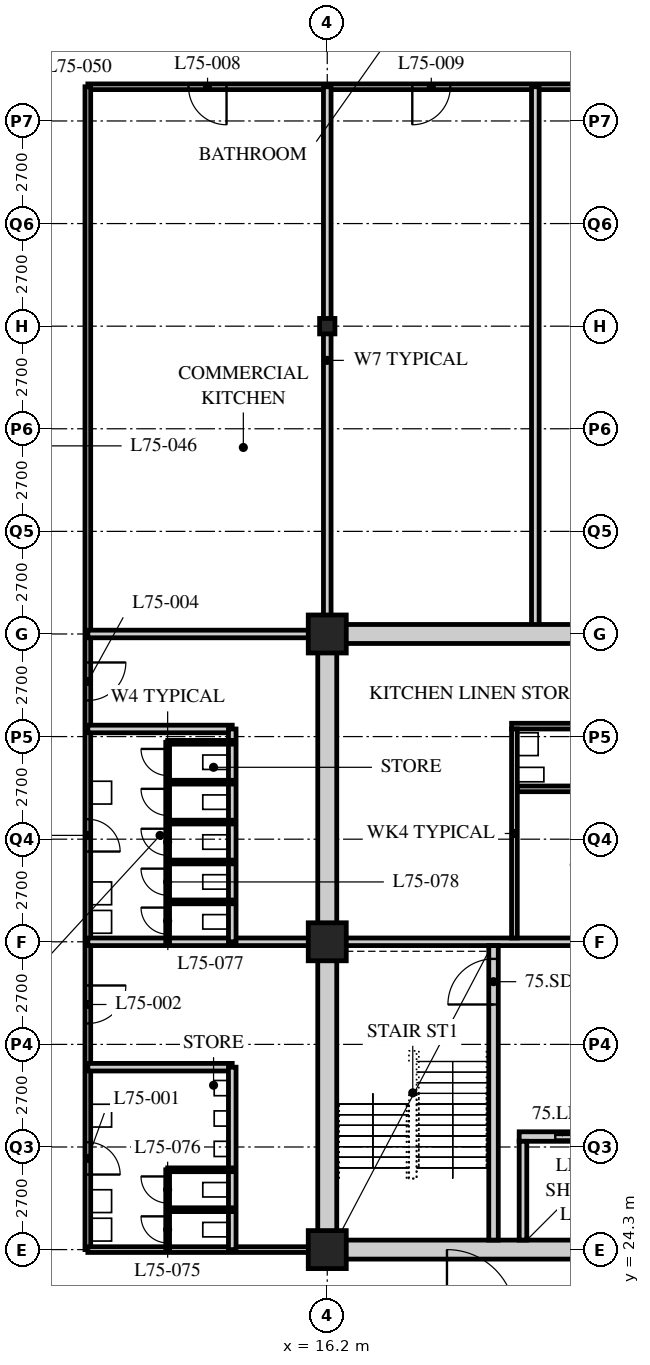
"""IFC4 building model, lengths in metres.
Left out: names, types, materials, properties, quantities, classifications, styles, units other than length and angle.
Written with IfcOpenShell. Run it as: python <this file> out.ifc"""

import sys

from ifc_helpers import new_model, si_unit, direction, frame, frame_2d, origin, origin_2d, place, context, subcontext, project, spatial, rectangle, hollow_rectangle, i_section, extrude, element, fill, save


model = new_model("IFC4")
c1 = context("Model", 3, precision=1e-05, world=origin(), true_north=direction((0.0, 1.0)))
c2 = subcontext(c1, "Body", "Model", "MODEL_VIEW")
j1 = project(units=[si_unit("LENGTHUNIT", "METRE"), si_unit("PLANEANGLEUNIT", "RADIAN")], contexts=[c1])
p1 = place(None, origin())
s1 = spatial("IfcSite", under=j1, at=p1, CompositionType="ELEMENT")
p2 = place(p1, origin())
s2 = spatial("IfcBuilding", under=s1, at=p2, CompositionType="ELEMENT")
p3 = place(p2, frame((0.0, 0.0, 293.1)))
s3 = spatial("IfcBuildingStorey", under=s2, at=p3, CompositionType="ELEMENT", Elevation=293.1)
for number, where, z_axis, x_axis in (
    (1, (16.2, 24.3, 0.0), (0.0, 0.0, 1.0), (1.0, 0.0, 0.0)),
    (2, (16.2, 32.4, 0.0), (0.0, 0.0, 1.0), (1.0, 0.0, 0.0)),
    (3, (16.2, 40.5, 0.0), (0.0, 0.0, 1.0), (1.0, 0.0, 0.0)),
):
    element("IfcColumn", number, at=place(p3, frame(where, z_axis=z_axis, x_axis=x_axis)), inside=s3, PredefinedType="COLUMN", context=c2, shape_type="SweptSolid", body=[
        extrude(hollow_rectangle(XDim=1.0, YDim=1.0, WallThickness=0.1, at=origin_2d()), origin(), (0.0, 0.0, 1.0), 5.4),
    ])
p4 = place(p3, frame((16.2, 48.6, 0.0), z_axis=(0.0, 0.0, 1.0), x_axis=(1.0, 0.0, 0.0)))
e4 = element("IfcColumn", 4, at=p4, inside=s3, PredefinedType="COLUMN", context=c2, shape_type="SweptSolid", body=[
    extrude(i_section(OverallWidth=0.403, OverallDepth=0.406, WebThickness=0.027, FlangeThickness=0.043, FilletRadius=0.015, at=origin_2d()), origin(), (0.0, 0.0, 1.0), 5.4),
])
p5 = place(p3, frame((27.14, 54.9, 0.0), z_axis=(0.0, 0.0, 1.0), x_axis=(-1.0, 0.0, 0.0)))
e5 = element("IfcWall", 5, at=p5, inside=s3, PredefinedType="PARTITIONING", context=c2, shape_type="SweptSolid", body=[
    extrude(rectangle(XDim=17.24, YDim=0.15, at=frame_2d((8.62, 0.0))), origin(), (0.0, 0.0, 1.0), 5.19),
])
p6 = place(p5, frame((13.59, 0.0, 0.0)))
e6 = element("IfcOpeningElement", 6, at=p6, cuts=e5, PredefinedType="OPENING", context=c2, shape_type="SweptSolid", body=[
    extrude(rectangle(XDim=1.0, YDim=2.1, at=frame_2d((0.5, 1.05))), frame((0.0, 0.085, 0.0), z_axis=(0.0, -1.0, 0.0), x_axis=(1.0, 0.0, 0.0)), (0.0, 0.0, 1.0), 0.17),
])
p7 = place(p5, frame((7.702, 0.0, 0.0)))
e7 = element("IfcOpeningElement", 7, at=p7, cuts=e5, PredefinedType="OPENING", context=c2, shape_type="SweptSolid", body=[
    extrude(rectangle(XDim=1.0, YDim=2.1, at=frame_2d((0.5, 1.05))), frame((0.0, 0.085, 0.0), z_axis=(0.0, -1.0, 0.0), x_axis=(1.0, 0.0, 0.0)), (0.0, 0.0, 1.0), 0.17),
])
p8 = place(p5, frame((2.228, 0.0, 0.0)))
e8 = element("IfcOpeningElement", 8, at=p8, cuts=e5, PredefinedType="OPENING", context=c2, shape_type="SweptSolid", body=[
    extrude(rectangle(XDim=1.0, YDim=2.1, at=frame_2d((0.5, 1.05))), frame((0.0, 0.085, 0.0), z_axis=(0.0, -1.0, 0.0), x_axis=(1.0, 0.0, 0.0)), (0.0, 0.0, 1.0), 0.17),
])
p9 = place(p3, frame((9.9, 54.9, 0.0), z_axis=(0.0, 0.0, 1.0), x_axis=(0.0, -1.0, 0.0)))
e9 = element("IfcWall", 9, at=p9, inside=s3, PredefinedType="PARTITIONING", context=c2, shape_type="SweptSolid", body=[
    extrude(rectangle(XDim=30.6, YDim=0.15, at=frame_2d((15.3, 0.0))), origin(), (0.0, 0.0, 1.0), 5.19),
])
p10 = place(p9, frame((27.775, 0.0, 0.0)))
e10 = element("IfcOpeningElement", 10, at=p10, cuts=e9, PredefinedType="OPENING", context=c2, shape_type="SweptSolid", body=[
    extrude(rectangle(XDim=0.85, YDim=2.1, at=frame_2d((0.425, 1.05))), frame((0.0, 0.085, 0.0), z_axis=(0.0, -1.0, 0.0), x_axis=(1.0, 0.0, 0.0)), (0.0, 0.0, 1.0), 0.17),
])
p11 = place(p9, frame((23.65, 0.0, 0.0)))
e11 = element("IfcOpeningElement", 11, at=p11, cuts=e9, PredefinedType="OPENING", context=c2, shape_type="SweptSolid", body=[
    extrude(rectangle(XDim=1.0, YDim=2.1, at=frame_2d((0.5, 1.05))), frame((0.0, 0.085, 0.0), z_axis=(0.0, -1.0, 0.0), x_axis=(1.0, 0.0, 0.0)), (0.0, 0.0, 1.0), 0.17),
])
p12 = place(p9, frame((19.275, 0.0, 0.0)))
e12 = element("IfcOpeningElement", 12, at=p12, cuts=e9, PredefinedType="OPENING", context=c2, shape_type="SweptSolid", body=[
    extrude(rectangle(XDim=0.85, YDim=2.1, at=frame_2d((0.425, 1.05))), frame((0.0, 0.085, 0.0), z_axis=(0.0, -1.0, 0.0), x_axis=(1.0, 0.0, 0.0)), (0.0, 0.0, 1.0), 0.17),
])
p13 = place(p9, frame((15.15, 0.0, 0.0)))
e13 = element("IfcOpeningElement", 13, at=p13, cuts=e9, PredefinedType="OPENING", context=c2, shape_type="SweptSolid", body=[
    extrude(rectangle(XDim=1.0, YDim=2.1, at=frame_2d((0.5, 1.05))), frame((0.0, 0.085, 0.0), z_axis=(0.0, -1.0, 0.0), x_axis=(1.0, 0.0, 0.0)), (0.0, 0.0, 1.0), 0.17),
])
p14 = place(p3, frame((9.9, 24.3, 0.0), z_axis=(0.0, 0.0, 1.0), x_axis=(1.0, 0.0, 0.0)))
e14 = element("IfcWall", 14, at=p14, inside=s3, PredefinedType="PARTITIONING", context=c2, shape_type="SweptSolid", body=[
    extrude(rectangle(XDim=6.1, YDim=0.15, at=frame_2d((3.05, 0.0))), origin(), (0.0, 0.0, 1.0), 4.271),
])
p15 = place(p3, frame((9.9, 32.4, 0.0), z_axis=(0.0, 0.0, 1.0), x_axis=(1.0, 0.0, 0.0)))
e15 = element("IfcWall", 15, at=p15, inside=s3, PredefinedType="SOLIDWALL", context=c2, shape_type="SweptSolid", body=[
    extrude(rectangle(XDim=6.3, YDim=0.2, at=frame_2d((3.15, 0.0))), origin(), (0.0, 0.0, 1.0), 4.271),
])
p16 = place(p3, frame((9.9, 29.1, 0.0), z_axis=(0.0, 0.0, 1.0), x_axis=(1.0, 0.0, 0.0)))
e16 = element("IfcWall", 16, at=p16, inside=s3, PredefinedType="SOLIDWALL", context=c2, shape_type="SweptSolid", body=[
    extrude(rectangle(XDim=3.8, YDim=0.2, at=frame_2d((1.9, 0.0))), origin(), (0.0, 0.0, 1.0), 5.19),
])
p17 = place(p3, frame((13.7, 24.3, 0.0), z_axis=(0.0, 0.0, 1.0), x_axis=(0.0, 1.0, 0.0)))
e17 = element("IfcWall", 17, at=p17, inside=s3, PredefinedType="SOLIDWALL", context=c2, shape_type="SweptSolid", body=[
    extrude(rectangle(XDim=4.8, YDim=0.2, at=frame_2d((2.4, 0.0))), origin(), (0.0, 0.0, 1.0), 5.19),
])
p18 = place(p3, frame((9.9, 38.0, 0.0), z_axis=(0.0, 0.0, 1.0), x_axis=(1.0, 0.0, 0.0)))
e18 = element("IfcWall", 18, at=p18, inside=s3, PredefinedType="SOLIDWALL", context=c2, shape_type="SweptSolid", body=[
    extrude(rectangle(XDim=3.8, YDim=0.2, at=frame_2d((1.9, 0.0))), origin(), (0.0, 0.0, 1.0), 5.19),
])
p19 = place(p3, frame((13.7, 32.4, 0.0), z_axis=(0.0, 0.0, 1.0), x_axis=(0.0, 1.0, 0.0)))
e19 = element("IfcWall", 19, at=p19, inside=s3, PredefinedType="SOLIDWALL", context=c2, shape_type="SweptSolid", body=[
    extrude(rectangle(XDim=5.6, YDim=0.2, at=frame_2d((2.8, 0.0))), origin(), (0.0, 0.0, 1.0), 5.19),
])
p20 = place(p3, frame((16.2, 40.5, 0.0), z_axis=(0.0, 0.0, 1.0), x_axis=(0.0, 1.0, 0.0)))
e20 = element("IfcWall", 20, at=p20, inside=s3, PredefinedType="SOLIDWALL", context=c2, shape_type="SweptSolid", body=[
    extrude(rectangle(XDim=14.4, YDim=0.2, at=frame_2d((7.2, 0.0))), origin(), (0.0, 0.0, 1.0), 4.271),
])
p21 = place(p3, frame((21.675, 54.9, 0.0), z_axis=(0.0, 0.0, 1.0), x_axis=(0.0, -1.0, 0.0)))
e21 = element("IfcWall", 21, at=p21, inside=s3, PredefinedType="SOLIDWALL", context=c2, shape_type="SweptSolid", body=[
    extrude(rectangle(XDim=14.4, YDim=0.2, at=frame_2d((7.2, 0.0))), origin(), (0.0, 0.0, 1.0), 5.19),
])
p22 = place(p3, frame((9.9, 40.5, 0.0), z_axis=(0.0, 0.0, 1.0), x_axis=(1.0, 0.0, 0.0)))
e22 = element("IfcWall", 22, at=p22, inside=s3, PredefinedType="SOLIDWALL", context=c2, shape_type="SweptSolid", body=[
    extrude(rectangle(XDim=6.3, YDim=0.2, at=frame_2d((3.15, 0.0))), origin(), (0.0, 0.0, 1.0), 4.271),
])
p23 = place(p3, frame((12.0, 24.3, 0.0), z_axis=(0.0, 0.0, 1.0), x_axis=(0.0, 1.0, 0.0)))
e23 = element("IfcWall", 23, at=p23, inside=s3, PredefinedType="PARTITIONING", context=c2, shape_type="SweptSolid", body=[
    extrude(rectangle(XDim=2.1, YDim=0.1, at=frame_2d((1.05, 0.0))), origin(), (0.0, 0.0, 1.0), 5.19),
])
p24 = place(p23, frame((0.175, 0.0, 0.0)))
e24 = element("IfcOpeningElement", 24, at=p24, cuts=e23, PredefinedType="OPENING", context=c2, shape_type="SweptSolid", body=[
    extrude(rectangle(XDim=0.7, YDim=2.0, at=frame_2d((0.35, 1.0))), frame((0.0, 0.06, 0.0), z_axis=(0.0, -1.0, 0.0), x_axis=(1.0, 0.0, 0.0)), (0.0, 0.0, 1.0), 0.12),
])
p25 = place(p23, frame((1.225, 0.0, 0.0)))
e25 = element("IfcOpeningElement", 25, at=p25, cuts=e23, PredefinedType="OPENING", context=c2, shape_type="SweptSolid", body=[
    extrude(rectangle(XDim=0.7, YDim=2.0, at=frame_2d((0.35, 1.0))), frame((0.0, 0.06, 0.0), z_axis=(0.0, -1.0, 0.0), x_axis=(1.0, 0.0, 0.0)), (0.0, 0.0, 1.0), 0.12),
])
for number, where, z_axis, x_axis in (
    (26, (12.0, 25.35, 0.0), (0.0, 0.0, 1.0), (1.0, 0.0, 0.0)),
    (27, (12.0, 26.4, 0.0), (0.0, 0.0, 1.0), (1.0, 0.0, 0.0)),
):
    element("IfcWall", number, at=place(p3, frame(where, z_axis=z_axis, x_axis=x_axis)), inside=s3, PredefinedType="PARTITIONING", context=c2, shape_type="SweptSolid", body=[
        extrude(rectangle(XDim=1.7, YDim=0.1, at=frame_2d((0.85, 0.0))), origin(), (0.0, 0.0, 1.0), 5.19),
    ])
p26 = place(p3, frame((12.0, 32.4, 0.0), z_axis=(0.0, 0.0, 1.0), x_axis=(0.0, 1.0, 0.0)))
e28 = element("IfcWall", 28, at=p26, inside=s3, PredefinedType="PARTITIONING", context=c2, shape_type="SweptSolid", body=[
    extrude(rectangle(XDim=5.25, YDim=0.1, at=frame_2d((2.625, 0.0))), origin(), (0.0, 0.0, 1.0), 5.19),
])
p27 = place(p26, frame((0.2, 0.0, 0.0)))
e29 = element("IfcOpeningElement", 29, at=p27, cuts=e28, PredefinedType="OPENING", context=c2, shape_type="SweptSolid", body=[
    extrude(rectangle(XDim=0.7, YDim=2.0, at=frame_2d((0.35, 1.0))), frame((0.0, 0.06, 0.0), z_axis=(0.0, -1.0, 0.0), x_axis=(1.0, 0.0, 0.0)), (0.0, 0.0, 1.0), 0.12),
])
p28 = place(p26, frame((1.225, 0.0, 0.0)))
e30 = element("IfcOpeningElement", 30, at=p28, cuts=e28, PredefinedType="OPENING", context=c2, shape_type="SweptSolid", body=[
    extrude(rectangle(XDim=0.7, YDim=2.0, at=frame_2d((0.35, 1.0))), frame((0.0, 0.06, 0.0), z_axis=(0.0, -1.0, 0.0), x_axis=(1.0, 0.0, 0.0)), (0.0, 0.0, 1.0), 0.12),
])
p29 = place(p26, frame((2.275, 0.0, 0.0)))
e31 = element("IfcOpeningElement", 31, at=p29, cuts=e28, PredefinedType="OPENING", context=c2, shape_type="SweptSolid", body=[
    extrude(rectangle(XDim=0.7, YDim=2.0, at=frame_2d((0.35, 1.0))), frame((0.0, 0.06, 0.0), z_axis=(0.0, -1.0, 0.0), x_axis=(1.0, 0.0, 0.0)), (0.0, 0.0, 1.0), 0.12),
])
p30 = place(p26, frame((3.325, 0.0, 0.0)))
e32 = element("IfcOpeningElement", 32, at=p30, cuts=e28, PredefinedType="OPENING", context=c2, shape_type="SweptSolid", body=[
    extrude(rectangle(XDim=0.7, YDim=2.0, at=frame_2d((0.35, 1.0))), frame((0.0, 0.06, 0.0), z_axis=(0.0, -1.0, 0.0), x_axis=(1.0, 0.0, 0.0)), (0.0, 0.0, 1.0), 0.12),
])
p31 = place(p26, frame((4.375, 0.0, 0.0)))
e33 = element("IfcOpeningElement", 33, at=p31, cuts=e28, PredefinedType="OPENING", context=c2, shape_type="SweptSolid", body=[
    extrude(rectangle(XDim=0.7, YDim=2.0, at=frame_2d((0.35, 1.0))), frame((0.0, 0.06, 0.0), z_axis=(0.0, -1.0, 0.0), x_axis=(1.0, 0.0, 0.0)), (0.0, 0.0, 1.0), 0.12),
])
for number, where, z_axis, x_axis in (
    (34, (12.0, 33.45, 0.0), (0.0, 0.0, 1.0), (1.0, 0.0, 0.0)),
    (35, (12.0, 34.5, 0.0), (0.0, 0.0, 1.0), (1.0, 0.0, 0.0)),
    (36, (12.0, 35.55, 0.0), (0.0, 0.0, 1.0), (1.0, 0.0, 0.0)),
    (37, (12.0, 36.6, 0.0), (0.0, 0.0, 1.0), (1.0, 0.0, 0.0)),
    (38, (12.0, 37.65, 0.0), (0.0, 0.0, 1.0), (1.0, 0.0, 0.0)),
):
    element("IfcWall", number, at=place(p3, frame(where, z_axis=z_axis, x_axis=x_axis)), inside=s3, PredefinedType="PARTITIONING", context=c2, shape_type="SweptSolid", body=[
        extrude(rectangle(XDim=1.7, YDim=0.1, at=frame_2d((0.85, 0.0))), origin(), (0.0, 0.0, 1.0), 5.19),
    ])
p32 = place(p3, frame((15.95, 24.3, 0.0), z_axis=(0.0, 0.0, 1.0), x_axis=(1.0, 0.0, 0.0)))
e39 = element("IfcWall", 39, at=p32, inside=s3, PredefinedType="SOLIDWALL", context=c2, shape_type="SweptSolid", body=[
    extrude(rectangle(XDim=24.8, YDim=0.5, at=frame_2d((12.4, 0.0))), origin(), (0.0, 0.0, 1.0), 4.271),
])
p33 = place(p32, frame((11.5, 0.0, 0.0)))
e40 = element("IfcOpeningElement", 40, at=p33, cuts=e39, PredefinedType="OPENING", context=c2, shape_type="SweptSolid", body=[
    extrude(rectangle(XDim=1.8, YDim=2.4, at=frame_2d((0.9, 1.2))), frame((0.0, 0.26, 0.0), z_axis=(0.0, -1.0, 0.0), x_axis=(1.0, 0.0, 0.0)), (0.0, 0.0, 1.0), 0.52),
])
p34 = place(p3, frame((15.95, 40.5, 0.0), z_axis=(0.0, 0.0, 1.0), x_axis=(1.0, 0.0, 0.0)))
e41 = element("IfcWall", 41, at=p34, inside=s3, PredefinedType="SOLIDWALL", context=c2, shape_type="SweptSolid", body=[
    extrude(rectangle(XDim=24.8, YDim=0.5, at=frame_2d((12.4, 0.0))), origin(), (0.0, 0.0, 1.0), 4.271),
])
p35 = place(p34, frame((11.5, 0.0, 0.0)))
e42 = element("IfcOpeningElement", 42, at=p35, cuts=e41, PredefinedType="OPENING", context=c2, shape_type="SweptSolid", body=[
    extrude(rectangle(XDim=1.8, YDim=2.4, at=frame_2d((0.9, 1.2))), frame((0.0, 0.26, 0.0), z_axis=(0.0, -1.0, 0.0), x_axis=(1.0, 0.0, 0.0)), (0.0, 0.0, 1.0), 0.52),
])
p36 = place(p3, frame((16.2, 24.55, 0.0), z_axis=(0.0, 0.0, 1.0), x_axis=(0.0, 1.0, 0.0)))
e43 = element("IfcWall", 43, at=p36, inside=s3, PredefinedType="SOLIDWALL", context=c2, shape_type="SweptSolid", body=[
    extrude(rectangle(XDim=15.7, YDim=0.5, at=frame_2d((7.85, 0.0))), origin(), (0.0, 0.0, 1.0), 4.271),
])
p37 = place(p3, frame((16.45, 32.4, 0.0), z_axis=(0.0, 0.0, 1.0), x_axis=(1.0, 0.0, 0.0)))
e44 = element("IfcWall", 44, at=p37, inside=s3, PredefinedType="SOLIDWALL", context=c2, shape_type="SweptSolid", body=[
    extrude(rectangle(XDim=7.95, YDim=0.2, at=frame_2d((3.975, 0.0))), origin(), (0.0, 0.0, 1.0), 4.428),
])
p38 = place(p3, frame((20.575, 24.55, 0.0), z_axis=(0.0, 0.0, 1.0), x_axis=(0.0, 1.0, 0.0)))
e45 = element("IfcWall", 45, at=p38, inside=s3, PredefinedType="SOLIDWALL", context=c2, shape_type="SweptSolid", body=[
    extrude(rectangle(XDim=7.75, YDim=0.25, at=frame_2d((3.875, 0.0))), origin(), (0.0, 0.0, 1.0), 5.19),
])
p39 = place(p38, frame((6.2, 0.0, 0.0)))
e46 = element("IfcOpeningElement", 46, at=p39, cuts=e45, PredefinedType="OPENING", context=c2, shape_type="SweptSolid", body=[
    extrude(rectangle(XDim=1.2, YDim=2.1, at=frame_2d((0.6, 1.05))), frame((0.0, 0.135, 0.0), z_axis=(0.0, -1.0, 0.0), x_axis=(1.0, 0.0, 0.0)), (0.0, 0.0, 1.0), 0.27),
])
p40 = place(p3, frame((21.25, 27.275, 0.0), z_axis=(0.0, 0.0, 1.0), x_axis=(1.0, 0.0, 0.0)))
e47 = element("IfcWall", 47, at=p40, inside=s3, PredefinedType="SOLIDWALL", context=c2, shape_type="SweptSolid", body=[
    extrude(rectangle(XDim=2.95, YDim=0.25, at=frame_2d((1.475, 0.0))), origin(), (0.0, 0.0, 1.0), 5.19),
])
p41 = place(p40, frame((0.95, 0.0, 0.0)))
e48 = element("IfcOpeningElement", 48, at=p41, cuts=e47, PredefinedType="OPENING", context=c2, shape_type="SweptSolid", body=[
    extrude(rectangle(XDim=1.1, YDim=2.4, at=frame_2d((0.55, 1.2))), frame((0.0, 0.135, 0.0), z_axis=(0.0, -1.0, 0.0), x_axis=(1.0, 0.0, 0.0)), (0.0, 0.0, 1.0), 0.27),
])
p42 = place(p3, frame((21.35, 24.55, 0.0), z_axis=(0.0, 0.0, 1.0), x_axis=(0.0, 1.0, 0.0)))
e49 = element("IfcWall", 49, at=p42, inside=s3, PredefinedType="SOLIDWALL", context=c2, shape_type="SweptSolid", body=[
    extrude(rectangle(XDim=2.6, YDim=0.2, at=frame_2d((1.3, 0.0))), origin(), (0.0, 0.0, 1.0), 5.19),
])
p43 = place(p3, frame((21.2, 36.425, 0.0), z_axis=(0.0, 0.0, 1.0), x_axis=(1.0, 0.0, 0.0)))
e50 = element("IfcWall", 50, at=p43, inside=s3, PredefinedType="PARTITIONING", context=c2, shape_type="SweptSolid", body=[
    extrude(rectangle(XDim=3.0, YDim=0.15, at=frame_2d((1.5, 0.0))), origin(), (0.0, 0.0, 1.0), 5.19),
])
p44 = place(p3, frame((21.05, 38.075, 0.0), z_axis=(0.0, 0.0, 1.0), x_axis=(1.0, 0.0, 0.0)))
e51 = element("IfcWall", 51, at=p44, inside=s3, PredefinedType="PARTITIONING", context=c2, shape_type="SweptSolid", body=[
    extrude(rectangle(XDim=3.15, YDim=0.15, at=frame_2d((1.575, 0.0))), origin(), (0.0, 0.0, 1.0), 5.19),
])
p45 = place(p3, frame((21.125, 32.5, 0.0), z_axis=(0.0, 0.0, 1.0), x_axis=(0.0, 1.0, 0.0)))
e52 = element("IfcWall", 52, at=p45, inside=s3, PredefinedType="PARTITIONING", context=c2, shape_type="SweptSolid", body=[
    extrude(rectangle(XDim=5.5, YDim=0.15, at=frame_2d((2.75, 0.0))), origin(), (0.0, 0.0, 1.0), 5.19),
])
p46 = place(p10, origin())
e53 = element("IfcDoor", 53, at=p46, inside=s3, OperationType="SINGLE_SWING_RIGHT", PredefinedType="DOOR", context=c2, shape_type="SweptSolid", body=[
    extrude(rectangle(XDim=0.85, YDim=2.1, at=frame_2d((0.425, 1.05))), frame((0.0, 0.025, 0.0), z_axis=(0.0, -1.0, 0.0), x_axis=(1.0, 0.0, 0.0)), (0.0, 0.0, 1.0), 0.05),
])
fill(e10, e53)
p47 = place(p11, origin())
e54 = element("IfcDoor", 54, at=p47, inside=s3, OperationType="SINGLE_SWING_LEFT", PredefinedType="DOOR", context=c2, shape_type="SweptSolid", body=[
    extrude(rectangle(XDim=1.0, YDim=2.1, at=frame_2d((0.5, 1.05))), frame((0.0, 0.025, 0.0), z_axis=(0.0, -1.0, 0.0), x_axis=(1.0, 0.0, 0.0)), (0.0, 0.0, 1.0), 0.05),
])
fill(e11, e54)
p48 = place(p12, origin())
e55 = element("IfcDoor", 55, at=p48, inside=s3, OperationType="SINGLE_SWING_RIGHT", PredefinedType="DOOR", context=c2, shape_type="SweptSolid", body=[
    extrude(rectangle(XDim=0.85, YDim=2.1, at=frame_2d((0.425, 1.05))), frame((0.0, 0.025, 0.0), z_axis=(0.0, -1.0, 0.0), x_axis=(1.0, 0.0, 0.0)), (0.0, 0.0, 1.0), 0.05),
])
fill(e12, e55)
p49 = place(p13, origin())
e56 = element("IfcDoor", 56, at=p49, inside=s3, OperationType="SINGLE_SWING_LEFT", PredefinedType="DOOR", context=c2, shape_type="SweptSolid", body=[
    extrude(rectangle(XDim=1.0, YDim=2.1, at=frame_2d((0.5, 1.05))), frame((0.0, 0.025, 0.0), z_axis=(0.0, -1.0, 0.0), x_axis=(1.0, 0.0, 0.0)), (0.0, 0.0, 1.0), 0.05),
])
fill(e13, e56)
p50 = place(p6, origin())
e57 = element("IfcDoor", 57, at=p50, inside=s3, OperationType="SINGLE_SWING_LEFT", PredefinedType="DOOR", context=c2, shape_type="SweptSolid", body=[
    extrude(rectangle(XDim=1.0, YDim=2.1, at=frame_2d((0.5, 1.05))), frame((0.0, 0.025, 0.0), z_axis=(0.0, -1.0, 0.0), x_axis=(1.0, 0.0, 0.0)), (0.0, 0.0, 1.0), 0.05),
])
fill(e6, e57)
p51 = place(p7, origin())
e58 = element("IfcDoor", 58, at=p51, inside=s3, OperationType="SINGLE_SWING_RIGHT", PredefinedType="DOOR", context=c2, shape_type="SweptSolid", body=[
    extrude(rectangle(XDim=1.0, YDim=2.1, at=frame_2d((0.5, 1.05))), frame((0.0, 0.025, 0.0), z_axis=(0.0, -1.0, 0.0), x_axis=(1.0, 0.0, 0.0)), (0.0, 0.0, 1.0), 0.05),
])
fill(e7, e58)
p52 = place(p24, origin())
e59 = element("IfcDoor", 59, at=p52, inside=s3, OperationType="SINGLE_SWING_RIGHT", PredefinedType="DOOR", context=c2, shape_type="SweptSolid", body=[
    extrude(rectangle(XDim=0.7, YDim=2.0, at=frame_2d((0.35, 1.0))), frame((0.0, 0.025, 0.0), z_axis=(0.0, -1.0, 0.0), x_axis=(1.0, 0.0, 0.0)), (0.0, 0.0, 1.0), 0.05),
])
fill(e24, e59)
p53 = place(p25, origin())
e60 = element("IfcDoor", 60, at=p53, inside=s3, OperationType="SINGLE_SWING_RIGHT", PredefinedType="DOOR", context=c2, shape_type="SweptSolid", body=[
    extrude(rectangle(XDim=0.7, YDim=2.0, at=frame_2d((0.35, 1.0))), frame((0.0, 0.025, 0.0), z_axis=(0.0, -1.0, 0.0), x_axis=(1.0, 0.0, 0.0)), (0.0, 0.0, 1.0), 0.05),
])
fill(e25, e60)
p54 = place(p27, origin())
e61 = element("IfcDoor", 61, at=p54, inside=s3, OperationType="SINGLE_SWING_RIGHT", PredefinedType="DOOR", context=c2, shape_type="SweptSolid", body=[
    extrude(rectangle(XDim=0.7, YDim=2.0, at=frame_2d((0.35, 1.0))), frame((0.0, 0.025, 0.0), z_axis=(0.0, -1.0, 0.0), x_axis=(1.0, 0.0, 0.0)), (0.0, 0.0, 1.0), 0.05),
])
fill(e29, e61)
p55 = place(p28, origin())
e62 = element("IfcDoor", 62, at=p55, inside=s3, OperationType="SINGLE_SWING_RIGHT", PredefinedType="DOOR", context=c2, shape_type="SweptSolid", body=[
    extrude(rectangle(XDim=0.7, YDim=2.0, at=frame_2d((0.35, 1.0))), frame((0.0, 0.025, 0.0), z_axis=(0.0, -1.0, 0.0), x_axis=(1.0, 0.0, 0.0)), (0.0, 0.0, 1.0), 0.05),
])
fill(e30, e62)
p56 = place(p29, origin())
e63 = element("IfcDoor", 63, at=p56, inside=s3, OperationType="SINGLE_SWING_RIGHT", PredefinedType="DOOR", context=c2, shape_type="SweptSolid", body=[
    extrude(rectangle(XDim=0.7, YDim=2.0, at=frame_2d((0.35, 1.0))), frame((0.0, 0.025, 0.0), z_axis=(0.0, -1.0, 0.0), x_axis=(1.0, 0.0, 0.0)), (0.0, 0.0, 1.0), 0.05),
])
fill(e31, e63)
p57 = place(p30, origin())
e64 = element("IfcDoor", 64, at=p57, inside=s3, OperationType="SINGLE_SWING_RIGHT", PredefinedType="DOOR", context=c2, shape_type="SweptSolid", body=[
    extrude(rectangle(XDim=0.7, YDim=2.0, at=frame_2d((0.35, 1.0))), frame((0.0, 0.025, 0.0), z_axis=(0.0, -1.0, 0.0), x_axis=(1.0, 0.0, 0.0)), (0.0, 0.0, 1.0), 0.05),
])
fill(e32, e64)
p58 = place(p31, origin())
e65 = element("IfcDoor", 65, at=p58, inside=s3, OperationType="SINGLE_SWING_RIGHT", PredefinedType="DOOR", context=c2, shape_type="SweptSolid", body=[
    extrude(rectangle(XDim=0.7, YDim=2.0, at=frame_2d((0.35, 1.0))), frame((0.0, 0.025, 0.0), z_axis=(0.0, -1.0, 0.0), x_axis=(1.0, 0.0, 0.0)), (0.0, 0.0, 1.0), 0.05),
])
fill(e33, e65)
p59 = place(p39, origin())
e66 = element("IfcDoor", 66, at=p59, inside=s3, OperationType="SINGLE_SWING_LEFT", PredefinedType="DOOR", context=c2, shape_type="SweptSolid", body=[
    extrude(rectangle(XDim=1.2, YDim=2.1, at=frame_2d((0.6, 1.05))), frame((0.0, 0.025, 0.0), z_axis=(0.0, -1.0, 0.0), x_axis=(1.0, 0.0, 0.0)), (0.0, 0.0, 1.0), 0.05),
])
fill(e46, e66)
p60 = place(p41, origin())
e67 = element("IfcDoor", 67, at=p60, inside=s3, OperationType="DOUBLE_DOOR_SLIDING", PredefinedType="DOOR", context=c2, shape_type="SweptSolid", body=[
    extrude(rectangle(XDim=1.1, YDim=2.4, at=frame_2d((0.55, 1.2))), frame((0.0, 0.025, 0.0), z_axis=(0.0, -1.0, 0.0), x_axis=(1.0, 0.0, 0.0)), (0.0, 0.0, 1.0), 0.05),
])
fill(e48, e67)
save(model, sys.argv[1])
